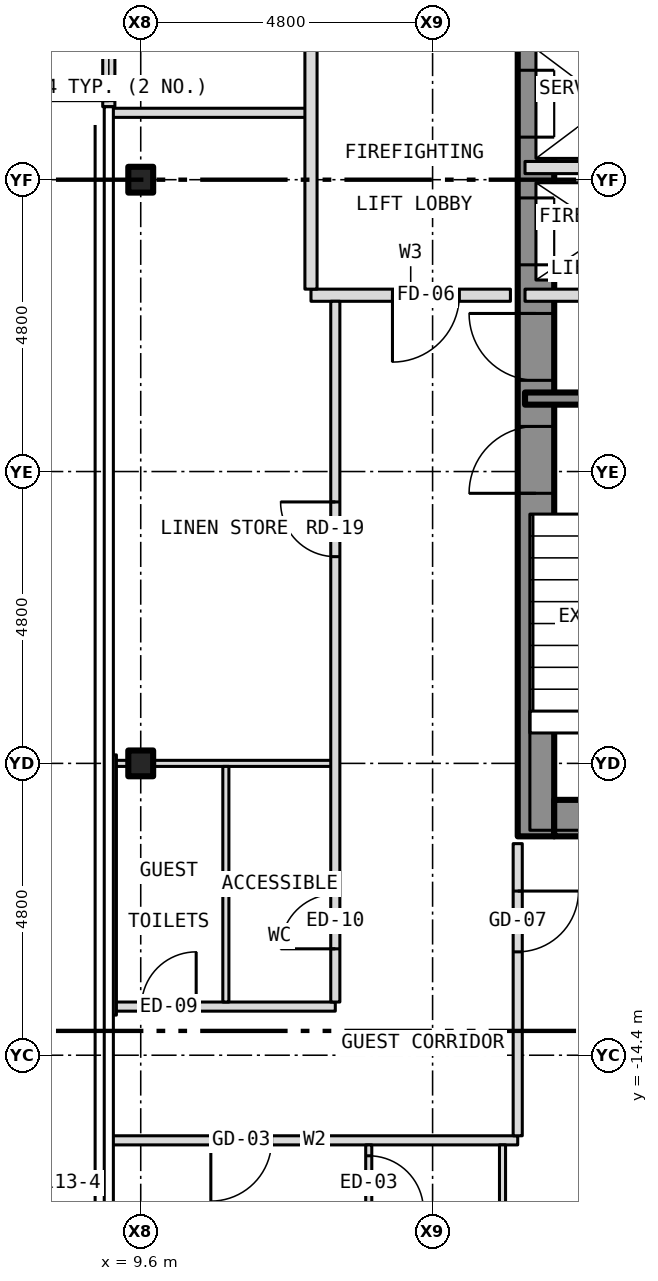
"""IFC4 building model, lengths in metres.
Left out: names, types, materials, properties, quantities, classifications, styles, units other than length and angle.
Written with IfcOpenShell. Run it as: python <this file> out.ifc"""

import sys

from ifc_helpers import new_model, si_unit, direction, frame, frame_2d, origin, origin_2d, place, context, subcontext, project, spatial, rectangle, i_section, extrude, element, fill, save


model = new_model("IFC4")
c1 = context("Model", 3, precision=1e-05, world=origin(), true_north=direction((0.0, 1.0)))
c2 = subcontext(c1, "Body", "Model", "MODEL_VIEW")
j1 = project(units=[si_unit("LENGTHUNIT", "METRE"), si_unit("PLANEANGLEUNIT", "RADIAN")], contexts=[c1])
p1 = place(None, origin())
s1 = spatial("IfcSite", under=j1, at=p1, CompositionType="ELEMENT")
p2 = place(p1, origin())
s2 = spatial("IfcBuilding", under=s1, at=p2, CompositionType="ELEMENT")
p3 = place(p2, frame((0.0, 0.0, 60.0)))
s3 = spatial("IfcBuildingStorey", under=s2, at=p3, CompositionType="ELEMENT", Elevation=60.0)
for number, where, z_axis, x_axis in (
    (1, (9.6, -9.6, -0.15), (0.0, 0.0, 1.0), (1.0, 0.0, 0.0)),
    (2, (9.6, 0.0, -0.15), (0.0, 0.0, 1.0), (1.0, 0.0, 0.0)),
):
    element("IfcColumn", number, at=place(p3, frame(where, z_axis=z_axis, x_axis=x_axis)), inside=s3, PredefinedType="COLUMN", context=c2, shape_type="SweptSolid", body=[
        extrude(i_section(OverallWidth=0.409, OverallDepth=0.424, WebThickness=0.033, FlangeThickness=0.052, at=origin_2d()), origin(), (0.0, 0.0, 1.0), 3.5),
    ])
p4 = place(p3, frame((16.1, -10.8, 0.0), z_axis=(0.0, 0.0, 1.0), x_axis=(0.0, 1.0, 0.0)))
e3 = element("IfcWall", 3, at=p4, inside=s3, PredefinedType="SHEAR", context=c2, shape_type="SweptSolid", body=[
    extrude(rectangle(XDim=21.6, YDim=0.6, at=frame_2d((10.8, 0.0))), origin(), (0.0, 0.0, 1.0), 3.25),
])
p5 = place(p4, frame((9.4, 0.0, 0.0)))
e4 = element("IfcOpeningElement", 4, at=p5, cuts=e3, PredefinedType="OPENING", context=c2, shape_type="SweptSolid", body=[
    extrude(rectangle(XDim=1.1, YDim=2.1, at=frame_2d((0.55, 1.05))), frame((0.0, 0.312, 0.0), z_axis=(0.0, -1.0, 0.0), x_axis=(1.0, 0.0, 0.0)), (0.0, 0.0, 1.0), 0.624),
])
p6 = place(p4, frame((11.5, 0.0, 0.0)))
e5 = element("IfcOpeningElement", 5, at=p6, cuts=e3, PredefinedType="OPENING", context=c2, shape_type="SweptSolid", body=[
    extrude(rectangle(XDim=1.1, YDim=2.1, at=frame_2d((0.55, 1.05))), frame((0.0, 0.312, 0.0), z_axis=(0.0, -1.0, 0.0), x_axis=(1.0, 0.0, 0.0)), (0.0, 0.0, 1.0), 0.624),
])
p7 = place(p4, frame((13.6, 0.0, 0.0)))
e6 = element("IfcOpeningElement", 6, at=p7, cuts=e3, PredefinedType="OPENING", context=c2, shape_type="SweptSolid", body=[
    extrude(rectangle(XDim=1.1, YDim=2.1, at=frame_2d((0.55, 1.05))), frame((0.0, 0.312, 0.0), z_axis=(0.0, -1.0, 0.0), x_axis=(1.0, 0.0, 0.0)), (0.0, 0.0, 1.0), 0.624),
])
p8 = place(p4, frame((15.7, 0.0, 0.0)))
e7 = element("IfcOpeningElement", 7, at=p8, cuts=e3, PredefinedType="OPENING", context=c2, shape_type="SweptSolid", body=[
    extrude(rectangle(XDim=1.1, YDim=2.1, at=frame_2d((0.55, 1.05))), frame((0.0, 0.312, 0.0), z_axis=(0.0, -1.0, 0.0), x_axis=(1.0, 0.0, 0.0)), (0.0, 0.0, 1.0), 0.624),
])
p9 = place(p4, frame((17.8, 0.0, 0.0)))
e8 = element("IfcOpeningElement", 8, at=p9, cuts=e3, PredefinedType="OPENING", context=c2, shape_type="SweptSolid", body=[
    extrude(rectangle(XDim=1.1, YDim=2.1, at=frame_2d((0.55, 1.05))), frame((0.0, 0.312, 0.0), z_axis=(0.0, -1.0, 0.0), x_axis=(1.0, 0.0, 0.0)), (0.0, 0.0, 1.0), 0.624),
])
p10 = place(p4, frame((5.642, 0.0, 0.0)))
e9 = element("IfcOpeningElement", 9, at=p10, cuts=e3, PredefinedType="OPENING", context=c2, shape_type="SweptSolid", body=[
    extrude(rectangle(XDim=1.1, YDim=2.1, at=frame_2d((0.55, 1.05))), frame((0.0, 0.312, 0.0), z_axis=(0.0, -1.0, 0.0), x_axis=(1.0, 0.0, 0.0)), (0.0, 0.0, 1.0), 0.624),
])
p11 = place(p4, frame((7.5, 0.0, 0.0)))
e10 = element("IfcOpeningElement", 10, at=p11, cuts=e3, PredefinedType="OPENING", context=c2, shape_type="SweptSolid", body=[
    extrude(rectangle(XDim=1.1, YDim=2.1, at=frame_2d((0.55, 1.05))), frame((0.0, 0.312, 0.0), z_axis=(0.0, -1.0, 0.0), x_axis=(1.0, 0.0, 0.0)), (0.0, 0.0, 1.0), 0.624),
])
p12 = place(p3, frame((16.4, -10.5, 0.0), z_axis=(0.0, 0.0, 1.0), x_axis=(1.0, 0.0, 0.0)))
e11 = element("IfcWall", 11, at=p12, inside=s3, PredefinedType="SHEAR", context=c2, shape_type="SweptSolid", body=[
    extrude(rectangle(XDim=7.0, YDim=0.6, at=frame_2d((3.5, 0.0))), origin(), (0.0, 0.0, 1.0), 3.25),
])
p13 = place(p3, frame((9.075, 1.2, 0.0), z_axis=(0.0, 0.0, 1.0), x_axis=(0.0, 1.0, 0.0)))
e12 = element("IfcWall", 12, at=p13, inside=s3, PredefinedType="SOLIDWALL", context=c2, shape_type="SweptSolid", body=[
    extrude(rectangle(XDim=2.0, YDim=0.2, at=frame_2d((1.0, 0.0))), origin(), (0.0, 0.0, 1.0), 2.593),
])
p14 = place(p13, frame((0.1, 0.0, 0.0)))
e13 = element("IfcOpeningElement", 13, at=p14, cuts=e12, PredefinedType="OPENING", context=c2, shape_type="SweptSolid", body=[
    extrude(rectangle(XDim=1.8, YDim=2.1, at=frame_2d((0.9, 1.05))), frame((0.0, 0.112, 0.0), z_axis=(0.0, -1.0, 0.0), x_axis=(1.0, 0.0, 0.0)), (0.0, 0.0, 1.0), 0.224),
])
p15 = place(p3, frame((9.12, -15.8, 0.0), z_axis=(0.0, 0.0, 1.0), x_axis=(1.0, 0.0, 0.0)))
e14 = element("IfcWall", 14, at=p15, inside=s3, PredefinedType="PARTITIONING", context=c2, shape_type="SweptSolid", body=[
    extrude(rectangle(XDim=6.68, YDim=0.15, at=frame_2d((3.34, 0.0))), origin(), (0.0, 0.0, 1.0), 3.35),
])
p16 = place(p15, frame((1.633, 0.0, 0.0)))
e15 = element("IfcOpeningElement", 15, at=p16, cuts=e14, PredefinedType="OPENING", context=c2, shape_type="SweptSolid", body=[
    extrude(rectangle(XDim=1.0, YDim=2.1, at=frame_2d((0.5, 1.05))), frame((0.0, 0.087, 0.0), z_axis=(0.0, -1.0, 0.0), x_axis=(1.0, 0.0, 0.0)), (0.0, 0.0, 1.0), 0.174),
])
p17 = place(p3, frame((9.15, -13.6, 0.0), z_axis=(0.0, 0.0, 1.0), x_axis=(1.0, 0.0, 0.0)))
e16 = element("IfcWall", 16, at=p17, inside=s3, PredefinedType="PARTITIONING", context=c2, shape_type="SweptSolid", body=[
    extrude(rectangle(XDim=3.65, YDim=0.15, at=frame_2d((1.825, 0.0))), origin(), (0.0, 0.0, 1.0), 3.35),
])
p18 = place(p17, frame((0.462, 0.0, 0.0)))
e17 = element("IfcOpeningElement", 17, at=p18, cuts=e16, PredefinedType="OPENING", context=c2, shape_type="SweptSolid", body=[
    extrude(rectangle(XDim=0.9, YDim=2.1, at=frame_2d((0.45, 1.05))), frame((0.0, 0.087, 0.0), z_axis=(0.0, -1.0, 0.0), x_axis=(1.0, 0.0, 0.0)), (0.0, 0.0, 1.0), 0.174),
])
p19 = place(p3, frame((9.15, -9.6, 0.0), z_axis=(0.0, 0.0, 1.0), x_axis=(1.0, 0.0, 0.0)))
e18 = element("IfcWall", 18, at=p19, inside=s3, PredefinedType="PARTITIONING", context=c2, shape_type="SweptSolid", body=[
    extrude(rectangle(XDim=0.654, YDim=0.1, at=frame_2d((0.327, 0.0))), origin(), (0.0, 0.0, 1.0), 3.35),
])
p20 = place(p3, frame((9.804, -9.6, 0.0), z_axis=(0.0, 0.0, 1.0), x_axis=(1.0, 0.0, 0.0)))
e19 = element("IfcWall", 19, at=p20, inside=s3, PredefinedType="PARTITIONING", context=c2, shape_type="SweptSolid", body=[
    extrude(rectangle(XDim=2.996, YDim=0.1, at=frame_2d((1.498, 0.0))), origin(), (0.0, 0.0, 1.0), 2.728),
])
p21 = place(p3, frame((15.92, -3.6, 0.0), z_axis=(0.0, 0.0, 1.0), x_axis=(1.0, 0.0, 0.0)))
e20 = element("IfcWall", 20, at=p21, inside=s3, PredefinedType="SHEAR", context=c2, shape_type="SweptSolid", body=[
    extrude(rectangle(XDim=4.08, YDim=0.2, at=frame_2d((2.04, 0.0))), origin(), (0.0, 0.0, 1.0), 3.25),
])
p22 = place(p3, frame((12.4, -1.9, 0.0), z_axis=(0.0, 0.0, 1.0), x_axis=(1.0, 0.0, 0.0)))
e21 = element("IfcWall", 21, at=p22, inside=s3, PredefinedType="PARTITIONING", context=c2, shape_type="SweptSolid", body=[
    extrude(rectangle(XDim=3.28, YDim=0.2, at=frame_2d((1.64, 0.0))), origin(), (0.0, 0.0, 1.0), 3.35),
])
p23 = place(p22, frame((1.34, 0.0, 0.0)))
e22 = element("IfcOpeningElement", 22, at=p23, cuts=e21, PredefinedType="OPENING", context=c2, shape_type="SweptSolid", body=[
    extrude(rectangle(XDim=1.1, YDim=2.1, at=frame_2d((0.55, 1.05))), frame((0.0, 0.112, 0.0), z_axis=(0.0, -1.0, 0.0), x_axis=(1.0, 0.0, 0.0)), (0.0, 0.0, 1.0), 0.224),
])
p24 = place(p3, frame((15.92, -1.9, 0.0), z_axis=(0.0, 0.0, 1.0), x_axis=(1.0, 0.0, 0.0)))
e23 = element("IfcWall", 23, at=p24, inside=s3, PredefinedType="PARTITIONING", context=c2, shape_type="SweptSolid", body=[
    extrude(rectangle(XDim=7.96, YDim=0.2, at=frame_2d((3.98, 0.0))), origin(), (0.0, 0.0, 1.0), 3.25),
])
p25 = place(p24, frame((3.74, 0.0, 0.0)))
e24 = element("IfcOpeningElement", 24, at=p25, cuts=e23, PredefinedType="OPENING", context=c2, shape_type="SweptSolid", body=[
    extrude(rectangle(XDim=0.9, YDim=2.1, at=frame_2d((0.45, 1.05))), frame((0.0, 0.112, 0.0), z_axis=(0.0, -1.0, 0.0), x_axis=(1.0, 0.0, 0.0)), (0.0, 0.0, 1.0), 0.224),
])
p26 = place(p3, frame((15.92, 0.2, 0.0), z_axis=(0.0, 0.0, 1.0), x_axis=(1.0, 0.0, 0.0)))
e25 = element("IfcWall", 25, at=p26, inside=s3, PredefinedType="PARTITIONING", context=c2, shape_type="SweptSolid", body=[
    extrude(rectangle(XDim=2.88, YDim=0.2, at=frame_2d((1.44, 0.0))), origin(), (0.0, 0.0, 1.0), 3.25),
])
p27 = place(p3, frame((9.12, 1.1, 0.0), z_axis=(0.0, 0.0, 1.0), x_axis=(1.0, 0.0, 0.0)))
e26 = element("IfcWall", 26, at=p27, inside=s3, PredefinedType="PARTITIONING", context=c2, shape_type="SweptSolid", body=[
    extrude(rectangle(XDim=3.28, YDim=0.15, at=frame_2d((1.64, 0.0))), origin(), (0.0, 0.0, 1.0), 3.35),
])
p28 = place(p3, frame((9.15, -13.74, 0.0), z_axis=(0.0, 0.0, 1.0), x_axis=(0.0, 1.0, 0.0)))
e27 = element("IfcWall", 27, at=p28, inside=s3, PredefinedType="PARTITIONING", context=c2, shape_type="SweptSolid", body=[
    extrude(rectangle(XDim=4.28, YDim=0.1, at=frame_2d((2.14, 0.0))), origin(), (0.0, 0.0, 1.0), 2.733),
])
p29 = place(p3, frame((11.0, -13.525, 0.0), z_axis=(0.0, 0.0, 1.0), x_axis=(0.0, 1.0, 0.0)))
e28 = element("IfcWall", 28, at=p29, inside=s3, PredefinedType="PARTITIONING", context=c2, shape_type="SweptSolid", body=[
    extrude(rectangle(XDim=3.875, YDim=0.1, at=frame_2d((1.938, 0.0))), origin(), (0.0, 0.0, 1.0), 3.35),
])
p30 = place(p3, frame((12.4, -1.8, 0.0), z_axis=(0.0, 0.0, 1.0), x_axis=(0.0, 1.0, 0.0)))
e29 = element("IfcWall", 29, at=p30, inside=s3, PredefinedType="PARTITIONING", context=c2, shape_type="SweptSolid", body=[
    extrude(rectangle(XDim=4.0, YDim=0.2, at=frame_2d((2.0, 0.0))), origin(), (0.0, 0.0, 1.0), 3.35),
])
p31 = place(p3, frame((12.8, -13.525, 0.0), z_axis=(0.0, 0.0, 1.0), x_axis=(0.0, 1.0, 0.0)))
e30 = element("IfcWall", 30, at=p31, inside=s3, PredefinedType="PARTITIONING", context=c2, shape_type="SweptSolid", body=[
    extrude(rectangle(XDim=11.525, YDim=0.15, at=frame_2d((5.762, 0.0))), origin(), (0.0, 0.0, 1.0), 3.35),
])
p32 = place(p31, frame((0.875, 0.0, 0.0)))
e31 = element("IfcOpeningElement", 31, at=p32, cuts=e30, PredefinedType="OPENING", context=c2, shape_type="SweptSolid", body=[
    extrude(rectangle(XDim=0.9, YDim=2.1, at=frame_2d((0.45, 1.05))), frame((0.0, 0.087, 0.0), z_axis=(0.0, -1.0, 0.0), x_axis=(1.0, 0.0, 0.0)), (0.0, 0.0, 1.0), 0.174),
])
p33 = place(p31, frame((7.325, 0.0, 0.0)))
e32 = element("IfcOpeningElement", 32, at=p33, cuts=e30, PredefinedType="OPENING", context=c2, shape_type="SweptSolid", body=[
    extrude(rectangle(XDim=0.9, YDim=2.1, at=frame_2d((0.45, 1.05))), frame((0.0, 0.087, 0.0), z_axis=(0.0, -1.0, 0.0), x_axis=(1.0, 0.0, 0.0)), (0.0, 0.0, 1.0), 0.174),
])
p34 = place(p3, frame((13.35, -18.95, 0.0), z_axis=(0.0, 0.0, 1.0), x_axis=(0.0, 1.0, 0.0)))
e33 = element("IfcWall", 33, at=p34, inside=s3, PredefinedType="PARTITIONING", context=c2, shape_type="SweptSolid", body=[
    extrude(rectangle(XDim=3.075, YDim=0.1, at=frame_2d((1.538, 0.0))), origin(), (0.0, 0.0, 1.0), 3.35),
])
p35 = place(p34, frame((1.996, 0.0, 0.0)))
e34 = element("IfcOpeningElement", 34, at=p35, cuts=e33, PredefinedType="OPENING", context=c2, shape_type="SweptSolid", body=[
    extrude(rectangle(XDim=0.9, YDim=2.1, at=frame_2d((0.45, 1.05))), frame((0.0, 0.062, 0.0), z_axis=(0.0, -1.0, 0.0), x_axis=(1.0, 0.0, 0.0)), (0.0, 0.0, 1.0), 0.124),
])
p36 = place(p3, frame((15.55, -23.88, 0.0), z_axis=(0.0, 0.0, 1.0), x_axis=(0.0, 1.0, 0.0)))
e35 = element("IfcWall", 35, at=p36, inside=s3, PredefinedType="PARTITIONING", context=c2, shape_type="SweptSolid", body=[
    extrude(rectangle(XDim=8.005, YDim=0.1, at=frame_2d((4.002, 0.0))), origin(), (0.0, 0.0, 1.0), 3.35),
])
p37 = place(p3, frame((15.8, -15.725, 0.0), z_axis=(0.0, 0.0, 1.0), x_axis=(0.0, 1.0, 0.0)))
e36 = element("IfcWall", 36, at=p37, inside=s3, PredefinedType="PARTITIONING", context=c2, shape_type="SweptSolid", body=[
    extrude(rectangle(XDim=4.805, YDim=0.15, at=frame_2d((2.403, 0.0))), origin(), (0.0, 0.0, 1.0), 3.35),
])
p38 = place(p37, frame((3.025, 0.0, 0.0)))
e37 = element("IfcOpeningElement", 37, at=p38, cuts=e36, PredefinedType="OPENING", context=c2, shape_type="SweptSolid", body=[
    extrude(rectangle(XDim=1.0, YDim=2.1, at=frame_2d((0.5, 1.05))), frame((0.0, 0.087, 0.0), z_axis=(0.0, -1.0, 0.0), x_axis=(1.0, 0.0, 0.0)), (0.0, 0.0, 1.0), 0.174),
])
p39 = place(p14, origin())
e38 = element("IfcDoor", 38, at=p39, inside=s3, OperationType="DOUBLE_DOOR_DOUBLE_SWING", PredefinedType="DOOR", context=c2, shape_type="SweptSolid", body=[
    extrude(rectangle(XDim=1.8, YDim=2.1, at=frame_2d((0.9, 1.05))), frame((0.0, 0.025, 0.0), z_axis=(0.0, -1.0, 0.0), x_axis=(1.0, 0.0, 0.0)), (0.0, 0.0, 1.0), 0.05),
])
fill(e13, e38)
p40 = place(p5, origin())
e39 = element("IfcDoor", 39, at=p40, inside=s3, OperationType="SLIDING_TO_LEFT", PredefinedType="DOOR", context=c2, shape_type="SweptSolid", body=[
    extrude(rectangle(XDim=1.1, YDim=2.1, at=frame_2d((0.55, 1.05))), frame((0.0, 0.025, 0.0), z_axis=(0.0, -1.0, 0.0), x_axis=(1.0, 0.0, 0.0)), (0.0, 0.0, 1.0), 0.05),
])
fill(e4, e39)
p41 = place(p6, origin())
e40 = element("IfcDoor", 40, at=p41, inside=s3, OperationType="SLIDING_TO_LEFT", PredefinedType="DOOR", context=c2, shape_type="SweptSolid", body=[
    extrude(rectangle(XDim=1.1, YDim=2.1, at=frame_2d((0.55, 1.05))), frame((0.0, 0.025, 0.0), z_axis=(0.0, -1.0, 0.0), x_axis=(1.0, 0.0, 0.0)), (0.0, 0.0, 1.0), 0.05),
])
fill(e5, e40)
p42 = place(p10, origin())
e41 = element("IfcDoor", 41, at=p42, inside=s3, OperationType="SINGLE_SWING_LEFT", PredefinedType="DOOR", context=c2, shape_type="SweptSolid", body=[
    extrude(rectangle(XDim=1.1, YDim=2.1, at=frame_2d((0.55, 1.05))), frame((0.0, 0.025, 0.0), z_axis=(0.0, -1.0, 0.0), x_axis=(1.0, 0.0, 0.0)), (0.0, 0.0, 1.0), 0.05),
])
fill(e9, e41)
p43 = place(p11, origin())
e42 = element("IfcDoor", 42, at=p43, inside=s3, OperationType="SINGLE_SWING_RIGHT", PredefinedType="DOOR", context=c2, shape_type="SweptSolid", body=[
    extrude(rectangle(XDim=1.1, YDim=2.1, at=frame_2d((0.55, 1.05))), frame((0.0, 0.025, 0.0), z_axis=(0.0, -1.0, 0.0), x_axis=(1.0, 0.0, 0.0)), (0.0, 0.0, 1.0), 0.05),
])
fill(e10, e42)
p44 = place(p23, origin())
e43 = element("IfcDoor", 43, at=p44, inside=s3, OperationType="SINGLE_SWING_LEFT", PredefinedType="DOOR", context=c2, shape_type="SweptSolid", body=[
    extrude(rectangle(XDim=1.1, YDim=2.1, at=frame_2d((0.55, 1.05))), frame((0.0, 0.025, 0.0), z_axis=(0.0, -1.0, 0.0), x_axis=(1.0, 0.0, 0.0)), (0.0, 0.0, 1.0), 0.05),
])
fill(e22, e43)
p45 = place(p16, origin())
e44 = element("IfcDoor", 44, at=p45, inside=s3, OperationType="SINGLE_SWING_LEFT", PredefinedType="DOOR", context=c2, shape_type="SweptSolid", body=[
    extrude(rectangle(XDim=1.0, YDim=2.1, at=frame_2d((0.5, 1.05))), frame((0.0, 0.025, 0.0), z_axis=(0.0, -1.0, 0.0), x_axis=(1.0, 0.0, 0.0)), (0.0, 0.0, 1.0), 0.05),
])
fill(e15, e44)
p46 = place(p35, origin())
e45 = element("IfcDoor", 45, at=p46, inside=s3, OperationType="SINGLE_SWING_LEFT", PredefinedType="DOOR", context=c2, shape_type="SweptSolid", body=[
    extrude(rectangle(XDim=0.9, YDim=2.1, at=frame_2d((0.45, 1.05))), frame((0.0, 0.025, 0.0), z_axis=(0.0, -1.0, 0.0), x_axis=(1.0, 0.0, 0.0)), (0.0, 0.0, 1.0), 0.05),
])
fill(e34, e45)
p47 = place(p38, origin())
e46 = element("IfcDoor", 46, at=p47, inside=s3, OperationType="SINGLE_SWING_RIGHT", PredefinedType="DOOR", context=c2, shape_type="SweptSolid", body=[
    extrude(rectangle(XDim=1.0, YDim=2.1, at=frame_2d((0.5, 1.05))), frame((0.0, 0.025, 0.0), z_axis=(0.0, -1.0, 0.0), x_axis=(1.0, 0.0, 0.0)), (0.0, 0.0, 1.0), 0.05),
])
fill(e37, e46)
p48 = place(p18, origin())
e47 = element("IfcDoor", 47, at=p48, inside=s3, OperationType="SINGLE_SWING_RIGHT", PredefinedType="DOOR", context=c2, shape_type="SweptSolid", body=[
    extrude(rectangle(XDim=0.9, YDim=2.1, at=frame_2d((0.45, 1.05))), frame((0.0, 0.025, 0.0), z_axis=(0.0, -1.0, 0.0), x_axis=(1.0, 0.0, 0.0)), (0.0, 0.0, 1.0), 0.05),
])
fill(e17, e47)
p49 = place(p32, origin())
e48 = element("IfcDoor", 48, at=p49, inside=s3, OperationType="SINGLE_SWING_LEFT", PredefinedType="DOOR", context=c2, shape_type="SweptSolid", body=[
    extrude(rectangle(XDim=0.9, YDim=2.1, at=frame_2d((0.45, 1.05))), frame((0.0, 0.025, 0.0), z_axis=(0.0, -1.0, 0.0), x_axis=(1.0, 0.0, 0.0)), (0.0, 0.0, 1.0), 0.05),
])
fill(e31, e48)
p50 = place(p33, origin())
e49 = element("IfcDoor", 49, at=p50, inside=s3, OperationType="SINGLE_SWING_RIGHT", PredefinedType="DOOR", context=c2, shape_type="SweptSolid", body=[
    extrude(rectangle(XDim=0.9, YDim=2.1, at=frame_2d((0.45, 1.05))), frame((0.0, 0.025, 0.0), z_axis=(0.0, -1.0, 0.0), x_axis=(1.0, 0.0, 0.0)), (0.0, 0.0, 1.0), 0.05),
])
fill(e32, e49)
save(model, sys.argv[1])
